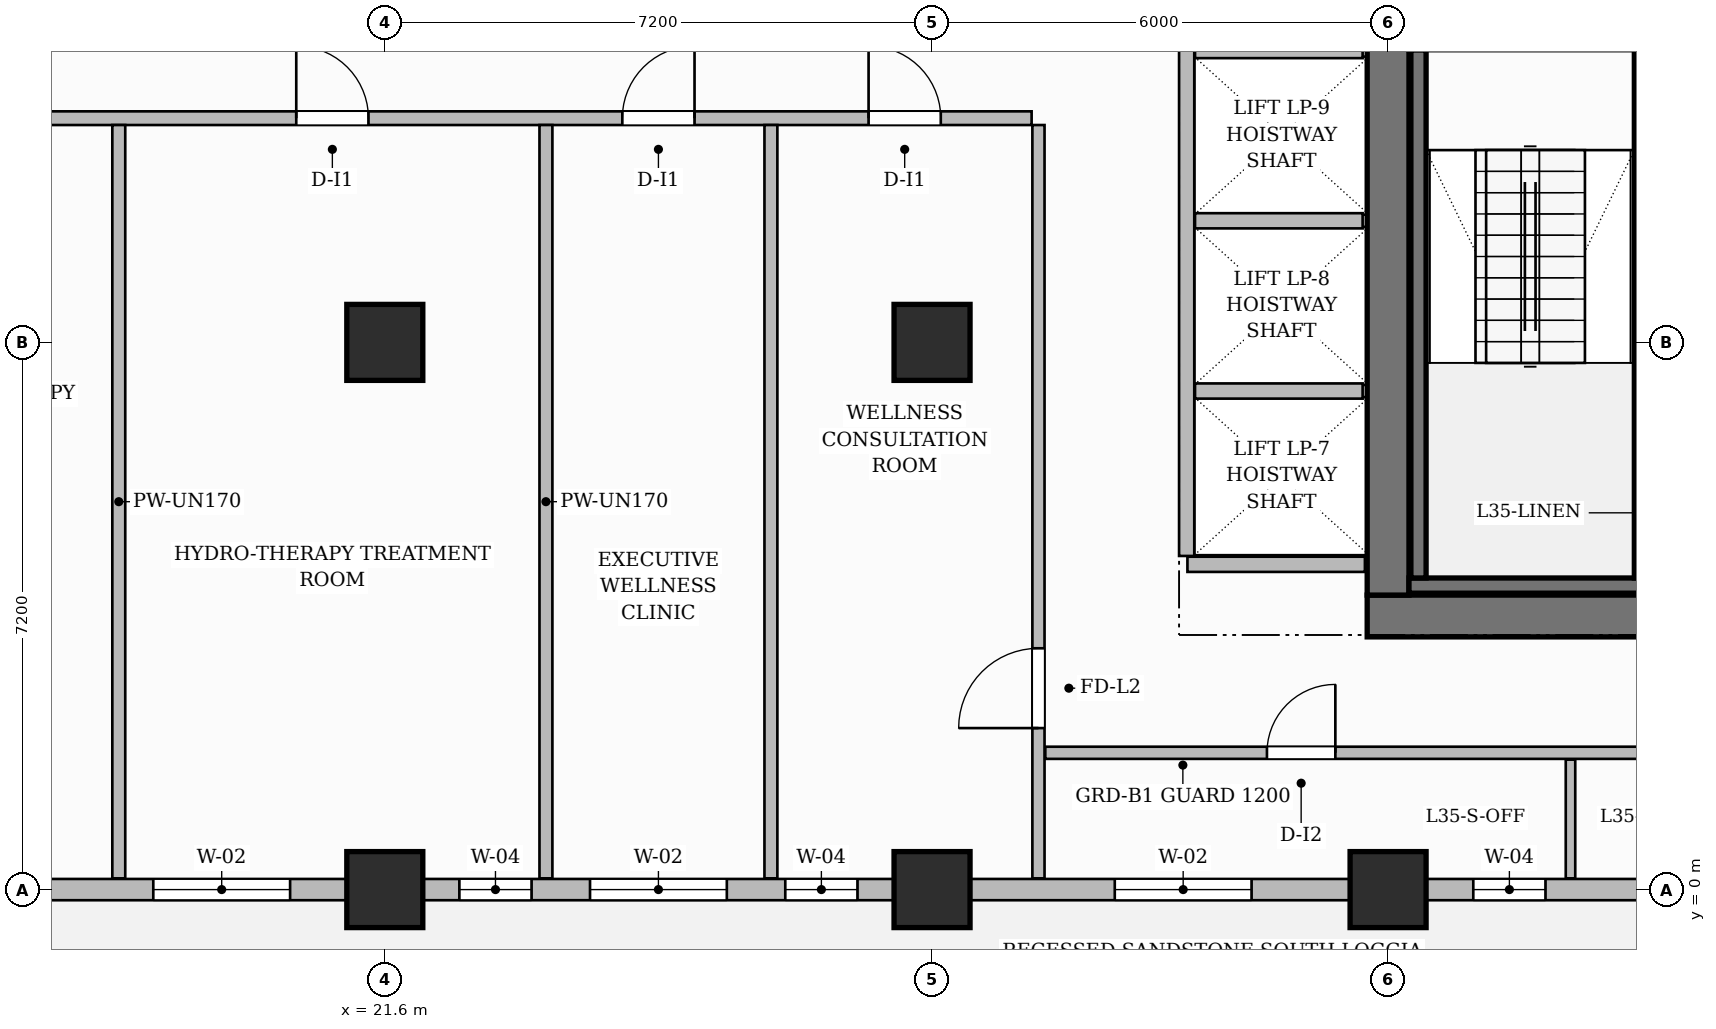
"""IFC4 building model, lengths in metres.
Left out: names, types, materials, properties, quantities, classifications, styles, units other than length and angle.
Written with IfcOpenShell. Run it as: python <this file> out.ifc"""

import sys

from ifc_helpers import new_model, si_unit, direction, frame, frame_2d, origin, origin_2d, place, context, subcontext, project, spatial, rectangle, extrude, source, transform, mapped, element, fill, save


model = new_model("IFC4")
c1 = context("Model", 3, precision=1e-05, world=origin(), true_north=direction((0.0, 1.0)))
c2 = subcontext(c1, "Body", "Model", "MODEL_VIEW")
j1 = project(units=[si_unit("LENGTHUNIT", "METRE"), si_unit("PLANEANGLEUNIT", "RADIAN")], contexts=[c1])
p1 = place(None, origin())
s1 = spatial("IfcSite", under=j1, at=p1, CompositionType="ELEMENT")
p2 = place(p1, origin())
s2 = spatial("IfcBuilding", under=s1, at=p2, CompositionType="ELEMENT")
p3 = place(p2, frame((0.0, 0.0, 141.4)))
s3 = spatial("IfcBuildingStorey", under=s2, at=p3, CompositionType="ELEMENT", Elevation=141.4)
p4 = place(p3, frame((34.525, 3.6, 0.0), z_axis=(0.0, 0.0, 1.0), x_axis=(1.0, 0.0, 0.0)))
e1 = element("IfcWall", 1, at=p4, inside=s3, PredefinedType="SHEAR", context=c2, shape_type="SweptSolid", body=[
    extrude(rectangle(XDim=15.55, YDim=0.55, at=frame_2d((7.775, 0.0))), origin(), (0.0, 0.0, 1.0), 3.7),
])
p5 = place(p4, frame((4.105, 0.0, 0.0)))
e2 = element("IfcOpeningElement", 2, at=p5, cuts=e1, PredefinedType="OPENING", context=c2, shape_type="SweptSolid", body=[
    extrude(rectangle(XDim=0.9, YDim=2.1, at=frame_2d((0.45, 1.05))), frame((0.0, 0.285, 0.0), z_axis=(0.0, -1.0, 0.0), x_axis=(1.0, 0.0, 0.0)), (0.0, 0.0, 1.0), 0.57),
])
p6 = place(p4, frame((5.675, 0.0, 0.0)))
e3 = element("IfcOpeningElement", 3, at=p6, cuts=e1, PredefinedType="OPENING", context=c2, shape_type="SweptSolid", body=[
    extrude(rectangle(XDim=0.9, YDim=2.1, at=frame_2d((0.45, 1.05))), frame((0.0, 0.285, 0.0), z_axis=(0.0, -1.0, 0.0), x_axis=(1.0, 0.0, 0.0)), (0.0, 0.0, 1.0), 0.57),
])
p7 = place(p4, frame((7.275, 0.0, 0.0)))
e4 = element("IfcOpeningElement", 4, at=p7, cuts=e1, PredefinedType="OPENING", context=c2, shape_type="SweptSolid", body=[
    extrude(rectangle(XDim=0.9, YDim=2.1, at=frame_2d((0.45, 1.05))), frame((0.0, 0.285, 0.0), z_axis=(0.0, -1.0, 0.0), x_axis=(1.0, 0.0, 0.0)), (0.0, 0.0, 1.0), 0.57),
])
p8 = place(p3, frame((34.8, 3.875, 0.0), z_axis=(0.0, 0.0, 1.0), x_axis=(0.0, 1.0, 0.0)))
e5 = element("IfcWall", 5, at=p8, inside=s3, PredefinedType="SHEAR", context=c2, shape_type="SweptSolid", body=[
    extrude(rectangle(XDim=10.25, YDim=0.55, at=frame_2d((5.125, 0.0))), origin(), (0.0, 0.0, 1.0), 3.7),
])
m1 = source(origin(), c2, "Body", "SweptSolid", [
    extrude(rectangle(XDim=1.0, YDim=1.0, at=origin_2d()), origin(), (0.0, 0.0, 1.0), 3.7),
])
for number, where, z_axis, x_axis in (
    (6, (21.6, 0.0, 0.0), (0.0, 0.0, 1.0), (1.0, 0.0, 0.0)),
    (7, (21.6, 7.2, 0.0), (0.0, 0.0, 1.0), (1.0, 0.0, 0.0)),
    (8, (28.8, 0.0, 0.0), (0.0, 0.0, 1.0), (1.0, 0.0, 0.0)),
    (9, (28.8, 7.2, 0.0), (0.0, 0.0, 1.0), (1.0, 0.0, 0.0)),
    (10, (34.8, 0.0, 0.0), (0.0, 0.0, 1.0), (1.0, 0.0, 0.0)),
):
    element("IfcColumn", number, at=place(p3, frame(where, z_axis=z_axis, x_axis=x_axis)), inside=s3, PredefinedType="COLUMN", context=c2, shape_type="MappedRepresentation", body=[
        mapped(m1, transform((0.0, 0.0, 0.0), scale=1.0)),
    ])
p9 = place(p3, frame((35.075, 4.0, 0.0), z_axis=(0.0, 0.0, 1.0), x_axis=(1.0, 0.0, 0.0)))
e11 = element("IfcWall", 11, at=p9, inside=s3, PredefinedType="SHEAR", context=c2, shape_type="SweptSolid", body=[
    extrude(rectangle(XDim=3.165, YDim=0.2, at=frame_2d((1.583, 0.0))), origin(), (0.0, 0.0, 1.0), 3.7),
])
for number, where, z_axis, x_axis in (
    (12, (35.2, 4.1, 0.0), (0.0, 0.0, 1.0), (0.0, 1.0, 0.0)),
    (13, (38.14, 4.1, 0.0), (0.0, 0.0, 1.0), (0.0, 1.0, 0.0)),
):
    element("IfcWall", number, at=place(p3, frame(where, z_axis=z_axis, x_axis=x_axis)), inside=s3, PredefinedType="SHEAR", context=c2, shape_type="SweptSolid", body=[
        extrude(rectangle(XDim=6.95, YDim=0.2, at=frame_2d((3.475, 0.0))), origin(), (0.0, 0.0, 1.0), 3.7),
    ])
p10 = place(p3, frame((32.16, 4.28, 0.0), z_axis=(0.0, 0.0, 1.0), x_axis=(1.0, 0.0, 0.0)))
e14 = element("IfcWall", 14, at=p10, inside=s3, PredefinedType="PARTITIONING", context=c2, shape_type="SweptSolid", body=[
    extrude(rectangle(XDim=2.335, YDim=0.2, at=frame_2d((1.167, 0.0))), origin(), (0.0, 0.0, 1.0), 3.4),
])
p11 = place(p3, frame((32.15, 4.39, 0.0), z_axis=(0.0, 0.0, 1.0), x_axis=(0.0, 1.0, 0.0)))
e15 = element("IfcWall", 15, at=p11, inside=s3, PredefinedType="PARTITIONING", context=c2, shape_type="SweptSolid", body=[
    extrude(rectangle(XDim=8.82, YDim=0.2, at=frame_2d((4.41, 0.0))), origin(), (0.0, 0.0, 1.0), 3.4),
])
for number, where, z_axis, x_axis in (
    (16, (32.26, 6.56, 0.0), (0.0, 0.0, 1.0), (1.0, 0.0, 0.0)),
    (17, (32.26, 8.8, 0.0), (0.0, 0.0, 1.0), (1.0, 0.0, 0.0)),
    (18, (32.26, 11.04, 0.0), (0.0, 0.0, 1.0), (1.0, 0.0, 0.0)),
):
    element("IfcWall", number, at=place(p3, frame(where, z_axis=z_axis, x_axis=x_axis)), inside=s3, PredefinedType="PARTITIONING", context=c2, shape_type="SweptSolid", body=[
        extrude(rectangle(XDim=2.205, YDim=0.2, at=frame_2d((1.103, 0.0))), origin(), (0.0, 0.0, 1.0), 3.4),
    ])
p12 = place(p3, frame((14.548, 10.15, 0.0), z_axis=(0.0, 0.0, 1.0), x_axis=(1.0, 0.0, 0.0)))
e19 = element("IfcWall", 19, at=p12, inside=s3, PredefinedType="PARTITIONING", context=c2, shape_type="SweptSolid", body=[
    extrude(rectangle(XDim=15.562, YDim=0.18, at=frame_2d((7.781, 0.0))), origin(), (0.0, 0.0, 1.0), 3.4),
])
p13 = place(p12, frame((1.227, 0.0, 0.0)))
e20 = element("IfcOpeningElement", 20, at=p13, cuts=e19, PredefinedType="OPENING", context=c2, shape_type="SweptSolid", body=[
    extrude(rectangle(XDim=0.95, YDim=2.15, at=frame_2d((0.475, 1.075))), frame((0.0, 0.1, 0.0), z_axis=(0.0, -1.0, 0.0), x_axis=(1.0, 0.0, 0.0)), (0.0, 0.0, 1.0), 0.2),
])
p14 = place(p12, frame((5.887, 0.0, 0.0)))
e21 = element("IfcOpeningElement", 21, at=p14, cuts=e19, PredefinedType="OPENING", context=c2, shape_type="SweptSolid", body=[
    extrude(rectangle(XDim=0.95, YDim=2.15, at=frame_2d((0.475, 1.075))), frame((0.0, 0.1, 0.0), z_axis=(0.0, -1.0, 0.0), x_axis=(1.0, 0.0, 0.0)), (0.0, 0.0, 1.0), 0.2),
])
p15 = place(p12, frame((10.177, 0.0, 0.0)))
e22 = element("IfcOpeningElement", 22, at=p15, cuts=e19, PredefinedType="OPENING", context=c2, shape_type="SweptSolid", body=[
    extrude(rectangle(XDim=0.95, YDim=2.15, at=frame_2d((0.475, 1.075))), frame((0.0, 0.1, 0.0), z_axis=(0.0, -1.0, 0.0), x_axis=(1.0, 0.0, 0.0)), (0.0, 0.0, 1.0), 0.2),
])
p16 = place(p12, frame((13.417, 0.0, 0.0)))
e23 = element("IfcOpeningElement", 23, at=p16, cuts=e19, PredefinedType="OPENING", context=c2, shape_type="SweptSolid", body=[
    extrude(rectangle(XDim=0.95, YDim=2.15, at=frame_2d((0.475, 1.075))), frame((0.0, 0.1, 0.0), z_axis=(0.0, -1.0, 0.0), x_axis=(1.0, 0.0, 0.0)), (0.0, 0.0, 1.0), 0.2),
])
p17 = place(p3, frame((30.2, 0.148, 0.0), z_axis=(0.0, 0.0, 1.0), x_axis=(0.0, 1.0, 0.0)))
e24 = element("IfcWall", 24, at=p17, inside=s3, PredefinedType="PARTITIONING", context=c2, shape_type="SweptSolid", body=[
    extrude(rectangle(XDim=9.912, YDim=0.16, at=frame_2d((4.956, 0.0))), origin(), (0.0, 0.0, 1.0), 3.4),
])
p18 = place(p17, frame((1.977, 0.0, 0.0)))
e25 = element("IfcOpeningElement", 25, at=p18, cuts=e24, PredefinedType="OPENING", context=c2, shape_type="SweptSolid", body=[
    extrude(rectangle(XDim=1.05, YDim=2.15, at=frame_2d((0.525, 1.075))), frame((0.0, 0.09, 0.0), z_axis=(0.0, -1.0, 0.0), x_axis=(1.0, 0.0, 0.0)), (0.0, 0.0, 1.0), 0.18),
])
p19 = place(p3, frame((30.29, 1.8, 0.0), z_axis=(0.0, 0.0, 1.0), x_axis=(1.0, 0.0, 0.0)))
e26 = element("IfcWall", 26, at=p19, inside=s3, PredefinedType="PARTITIONING", context=c2, shape_type="SweptSolid", body=[
    extrude(rectangle(XDim=19.37, YDim=0.16, at=frame_2d((9.685, 0.0))), origin(), (0.0, 0.0, 1.0), 3.4),
])
p20 = place(p19, frame((2.916, 0.0, 0.0)))
e27 = element("IfcOpeningElement", 27, at=p20, cuts=e26, PredefinedType="OPENING", context=c2, shape_type="SweptSolid", body=[
    extrude(rectangle(XDim=0.9, YDim=2.15, at=frame_2d((0.45, 1.075))), frame((0.0, 0.09, 0.0), z_axis=(0.0, -1.0, 0.0), x_axis=(1.0, 0.0, 0.0)), (0.0, 0.0, 1.0), 0.18),
])
p21 = place(p19, frame((9.66, 0.0, 0.0)))
e28 = element("IfcOpeningElement", 28, at=p21, cuts=e26, PredefinedType="OPENING", context=c2, shape_type="SweptSolid", body=[
    extrude(rectangle(XDim=0.9, YDim=2.15, at=frame_2d((0.45, 1.075))), frame((0.0, 0.09, 0.0), z_axis=(0.0, -1.0, 0.0), x_axis=(1.0, 0.0, 0.0)), (0.0, 0.0, 1.0), 0.18),
])
p22 = place(p19, frame((15.86, 0.0, 0.0)))
e29 = element("IfcOpeningElement", 29, at=p22, cuts=e26, PredefinedType="OPENING", context=c2, shape_type="SweptSolid", body=[
    extrude(rectangle(XDim=0.9, YDim=2.15, at=frame_2d((0.45, 1.075))), frame((0.0, 0.09, 0.0), z_axis=(0.0, -1.0, 0.0), x_axis=(1.0, 0.0, 0.0)), (0.0, 0.0, 1.0), 0.18),
])
p23 = place(p3, frame((37.2, 0.148, 0.0), z_axis=(0.0, 0.0, 1.0), x_axis=(0.0, 1.0, 0.0)))
e30 = element("IfcWall", 30, at=p23, inside=s3, PredefinedType="PARTITIONING", context=c2, shape_type="SweptSolid", body=[
    extrude(rectangle(XDim=1.562, YDim=0.125, at=frame_2d((0.781, 0.0))), origin(), (0.0, 0.0, 1.0), 3.4),
])
p24 = place(p3, frame((18.1, 0.148, 0.0), z_axis=(0.0, 0.0, 1.0), x_axis=(0.0, 1.0, 0.0)))
e31 = element("IfcWall", 31, at=p24, inside=s3, PredefinedType="PARTITIONING", context=c2, shape_type="SweptSolid", body=[
    extrude(rectangle(XDim=9.912, YDim=0.17, at=frame_2d((4.956, 0.0))), origin(), (0.0, 0.0, 1.0), 3.055),
])
for number, where, z_axis, x_axis in (
    (32, (23.72, 0.148, 0.0), (0.0, 0.0, 1.0), (0.0, 1.0, 0.0)),
    (33, (26.68, 0.148, 0.0), (0.0, 0.0, 1.0), (0.0, 1.0, 0.0)),
):
    element("IfcWall", number, at=place(p3, frame(where, z_axis=z_axis, x_axis=x_axis)), inside=s3, PredefinedType="PARTITIONING", context=c2, shape_type="SweptSolid", body=[
        extrude(rectangle(XDim=9.912, YDim=0.17, at=frame_2d((4.956, 0.0))), origin(), (0.0, 0.0, 1.0), 3.4),
    ])
p25 = place(p3, frame((14.4, 0.0, 0.0), z_axis=(0.0, 0.0, 1.0), x_axis=(1.0, 0.0, 0.0)))
e34 = element("IfcWall", 34, at=p25, inside=s3, PredefinedType="SOLIDWALL", context=c2, shape_type="SweptSolid", body=[
    extrude(rectangle(XDim=35.4, YDim=0.28, at=frame_2d((17.7, 0.0))), origin(), (0.0, 0.0, 1.0), 2.885),
])
p26 = place(p25, frame((0.85, 0.0, 0.0)))
e35 = element("IfcOpeningElement", 35, at=p26, cuts=e34, PredefinedType="OPENING", context=c2, shape_type="SweptSolid", body=[
    extrude(rectangle(XDim=1.2, YDim=2.2, at=frame_2d((0.6, 1.1))), frame((0.0, 0.15, 0.0), z_axis=(0.0, -1.0, 0.0), x_axis=(1.0, 0.0, 0.0)), (0.0, 0.0, 1.0), 0.3),
])
p27 = place(p25, frame((4.154, 0.0, 0.8)))
e36 = element("IfcOpeningElement", 36, at=p27, cuts=e34, PredefinedType="OPENING", context=c2, shape_type="SweptSolid", body=[
    extrude(rectangle(XDim=1.8, YDim=1.85, at=frame_2d((0.9, 0.925))), frame((0.0, 0.15, 0.0), z_axis=(0.0, -1.0, 0.0), x_axis=(1.0, 0.0, 0.0)), (0.0, 0.0, 1.0), 0.3),
])
p28 = place(p25, frame((8.181, 0.0, 0.8)))
e37 = element("IfcOpeningElement", 37, at=p28, cuts=e34, PredefinedType="OPENING", context=c2, shape_type="SweptSolid", body=[
    extrude(rectangle(XDim=0.95, YDim=1.75, at=frame_2d((0.475, 0.875))), frame((0.0, 0.15, 0.0), z_axis=(0.0, -1.0, 0.0), x_axis=(1.0, 0.0, 0.0)), (0.0, 0.0, 1.0), 0.3),
])
p29 = place(p25, frame((9.9, 0.0, 0.8)))
e38 = element("IfcOpeningElement", 38, at=p29, cuts=e34, PredefinedType="OPENING", context=c2, shape_type="SweptSolid", body=[
    extrude(rectangle(XDim=1.8, YDim=1.85, at=frame_2d((0.9, 0.925))), frame((0.0, 0.15, 0.0), z_axis=(0.0, -1.0, 0.0), x_axis=(1.0, 0.0, 0.0)), (0.0, 0.0, 1.0), 0.3),
])
p30 = place(p25, frame((12.469, 0.0, 0.8)))
e39 = element("IfcOpeningElement", 39, at=p30, cuts=e34, PredefinedType="OPENING", context=c2, shape_type="SweptSolid", body=[
    extrude(rectangle(XDim=0.95, YDim=1.75, at=frame_2d((0.475, 0.875))), frame((0.0, 0.15, 0.0), z_axis=(0.0, -1.0, 0.0), x_axis=(1.0, 0.0, 0.0)), (0.0, 0.0, 1.0), 0.3),
])
p31 = place(p25, frame((16.804, 0.0, 0.8)))
e40 = element("IfcOpeningElement", 40, at=p31, cuts=e34, PredefinedType="OPENING", context=c2, shape_type="SweptSolid", body=[
    extrude(rectangle(XDim=1.8, YDim=1.85, at=frame_2d((0.9, 0.925))), frame((0.0, 0.15, 0.0), z_axis=(0.0, -1.0, 0.0), x_axis=(1.0, 0.0, 0.0)), (0.0, 0.0, 1.0), 0.3),
])
p32 = place(p25, frame((21.521, 0.0, 0.8)))
e41 = element("IfcOpeningElement", 41, at=p32, cuts=e34, PredefinedType="OPENING", context=c2, shape_type="SweptSolid", body=[
    extrude(rectangle(XDim=0.95, YDim=1.75, at=frame_2d((0.475, 0.875))), frame((0.0, 0.15, 0.0), z_axis=(0.0, -1.0, 0.0), x_axis=(1.0, 0.0, 0.0)), (0.0, 0.0, 1.0), 0.3),
])
p33 = place(p25, frame((23.904, 0.0, 0.8)))
e42 = element("IfcOpeningElement", 42, at=p33, cuts=e34, PredefinedType="OPENING", context=c2, shape_type="SweptSolid", body=[
    extrude(rectangle(XDim=1.8, YDim=1.85, at=frame_2d((0.9, 0.925))), frame((0.0, 0.15, 0.0), z_axis=(0.0, -1.0, 0.0), x_axis=(1.0, 0.0, 0.0)), (0.0, 0.0, 1.0), 0.3),
])
p34 = place(p25, frame((29.681, 0.0, 0.8)))
e43 = element("IfcOpeningElement", 43, at=p34, cuts=e34, PredefinedType="OPENING", context=c2, shape_type="SweptSolid", body=[
    extrude(rectangle(XDim=1.8, YDim=1.85, at=frame_2d((0.9, 0.925))), frame((0.0, 0.15, 0.0), z_axis=(0.0, -1.0, 0.0), x_axis=(1.0, 0.0, 0.0)), (0.0, 0.0, 1.0), 0.3),
])
p35 = place(p25, frame((32.327, 0.0, 0.8)))
e44 = element("IfcOpeningElement", 44, at=p35, cuts=e34, PredefinedType="OPENING", context=c2, shape_type="SweptSolid", body=[
    extrude(rectangle(XDim=1.8, YDim=1.85, at=frame_2d((0.9, 0.925))), frame((0.0, 0.15, 0.0), z_axis=(0.0, -1.0, 0.0), x_axis=(1.0, 0.0, 0.0)), (0.0, 0.0, 1.0), 0.3),
])
m2 = source(origin(), c2, "Body", "SweptSolid", [
    extrude(rectangle(XDim=1.05, YDim=2.15, at=frame_2d((0.525, 1.075))), frame((0.0, 0.025, 0.0), z_axis=(0.0, -1.0, 0.0), x_axis=(1.0, 0.0, 0.0)), (0.0, 0.0, 1.0), 0.05),
])
p36 = place(p18, origin())
e45 = element("IfcDoor", 45, at=p36, inside=s3, OperationType="SINGLE_SWING_LEFT", PredefinedType="DOOR", context=c2, shape_type="MappedRepresentation", body=[
    mapped(m2, transform((0.0, 0.0, 0.0), scale=1.0)),
])
fill(e25, e45)
m3 = source(origin(), c2, "Body", "SweptSolid", [
    extrude(rectangle(XDim=0.9, YDim=2.15, at=frame_2d((0.45, 1.075))), frame((0.0, 0.025, 0.0), z_axis=(0.0, -1.0, 0.0), x_axis=(1.0, 0.0, 0.0)), (0.0, 0.0, 1.0), 0.05),
])
p37 = place(p20, origin())
e46 = element("IfcDoor", 46, at=p37, inside=s3, OperationType="SINGLE_SWING_RIGHT", PredefinedType="DOOR", context=c2, shape_type="MappedRepresentation", body=[
    mapped(m3, transform((0.0, 0.0, 0.0), scale=1.0)),
])
fill(e27, e46)
m4 = source(origin(), c2, "Body", "SweptSolid", [
    extrude(rectangle(XDim=0.95, YDim=2.15, at=frame_2d((0.475, 1.075))), frame((0.0, 0.025, 0.0), z_axis=(0.0, -1.0, 0.0), x_axis=(1.0, 0.0, 0.0)), (0.0, 0.0, 1.0), 0.05),
])
p38 = place(p14, origin())
e47 = element("IfcDoor", 47, at=p38, inside=s3, OperationType="SINGLE_SWING_LEFT", PredefinedType="DOOR", context=c2, shape_type="MappedRepresentation", body=[
    mapped(m4, transform((0.0, 0.0, 0.0), scale=1.0)),
])
fill(e21, e47)
p39 = place(p15, origin())
e48 = element("IfcDoor", 48, at=p39, inside=s3, OperationType="SINGLE_SWING_RIGHT", PredefinedType="DOOR", context=c2, shape_type="MappedRepresentation", body=[
    mapped(m4, transform((0.0, 0.0, 0.0), scale=1.0)),
])
fill(e22, e48)
p40 = place(p16, origin())
e49 = element("IfcDoor", 49, at=p40, inside=s3, OperationType="SINGLE_SWING_LEFT", PredefinedType="DOOR", context=c2, shape_type="MappedRepresentation", body=[
    mapped(m4, transform((0.0, 0.0, 0.0), scale=1.0)),
])
fill(e23, e49)
m5 = source(origin(), c2, "Body", "SweptSolid", [
    extrude(rectangle(XDim=1.8, YDim=1.85, at=frame_2d((0.9, 0.925))), frame((0.0, 0.03, 0.0), z_axis=(0.0, -1.0, 0.0), x_axis=(1.0, 0.0, 0.0)), (0.0, 0.0, 1.0), 0.06),
])
p41 = place(p27, origin())
e50 = element("IfcWindow", 50, at=p41, inside=s3, PartitioningType="DOUBLE_PANEL_VERTICAL", PredefinedType="WINDOW", context=c2, shape_type="MappedRepresentation", body=[
    mapped(m5, transform((0.0, 0.0, 0.0), scale=1.0)),
])
fill(e36, e50)
m6 = source(origin(), c2, "Body", "SweptSolid", [
    extrude(rectangle(XDim=0.95, YDim=1.75, at=frame_2d((0.475, 0.875))), frame((0.0, 0.03, 0.0), z_axis=(0.0, -1.0, 0.0), x_axis=(1.0, 0.0, 0.0)), (0.0, 0.0, 1.0), 0.06),
])
p42 = place(p28, origin())
e51 = element("IfcWindow", 51, at=p42, inside=s3, PartitioningType="SINGLE_PANEL", PredefinedType="WINDOW", context=c2, shape_type="MappedRepresentation", body=[
    mapped(m6, transform((0.0, 0.0, 0.0), scale=1.0)),
])
fill(e37, e51)
p43 = place(p29, origin())
e52 = element("IfcWindow", 52, at=p43, inside=s3, PartitioningType="DOUBLE_PANEL_VERTICAL", PredefinedType="WINDOW", context=c2, shape_type="MappedRepresentation", body=[
    mapped(m5, transform((0.0, 0.0, 0.0), scale=1.0)),
])
fill(e38, e52)
p44 = place(p30, origin())
e53 = element("IfcWindow", 53, at=p44, inside=s3, PartitioningType="SINGLE_PANEL", PredefinedType="WINDOW", context=c2, shape_type="MappedRepresentation", body=[
    mapped(m6, transform((0.0, 0.0, 0.0), scale=1.0)),
])
fill(e39, e53)
p45 = place(p31, origin())
e54 = element("IfcWindow", 54, at=p45, inside=s3, PartitioningType="DOUBLE_PANEL_VERTICAL", PredefinedType="WINDOW", context=c2, shape_type="MappedRepresentation", body=[
    mapped(m5, transform((0.0, 0.0, 0.0), scale=1.0)),
])
fill(e40, e54)
p46 = place(p32, origin())
e55 = element("IfcWindow", 55, at=p46, inside=s3, PartitioningType="SINGLE_PANEL", PredefinedType="WINDOW", context=c2, shape_type="MappedRepresentation", body=[
    mapped(m6, transform((0.0, 0.0, 0.0), scale=1.0)),
])
fill(e41, e55)
save(model, sys.argv[1])
